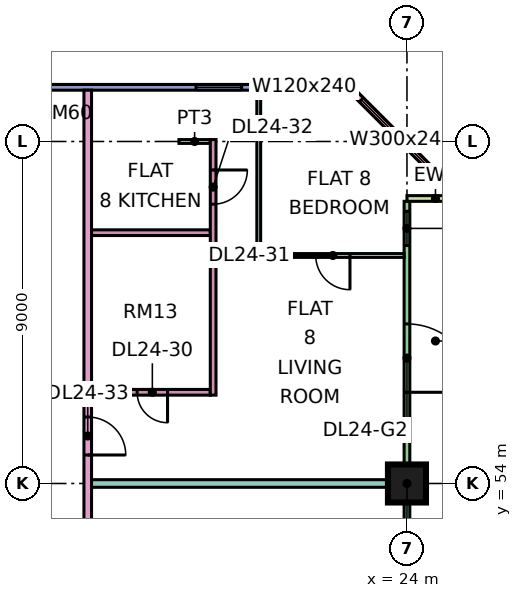
"""IFC4 building model, lengths in metres.
Left out: names, types, materials, properties, quantities, classifications, styles, units other than length and angle.
Written with IfcOpenShell. Run it as: python <this file> out.ifc"""

import sys

from ifc_helpers import new_model, si_unit, direction, frame, frame_2d, origin, origin_2d, place, context, subcontext, project, spatial, rectangle, extrude, element, fill, save


model = new_model("IFC4")
c1 = context("Model", 3, precision=1e-05, world=origin(), true_north=direction((0.0, 1.0)))
c2 = subcontext(c1, "Body", "Model", "MODEL_VIEW")
j1 = project(units=[si_unit("LENGTHUNIT", "METRE"), si_unit("PLANEANGLEUNIT", "RADIAN")], contexts=[c1])
p1 = place(None, origin())
s1 = spatial("IfcSite", under=j1, at=p1, CompositionType="ELEMENT")
p2 = place(p1, origin())
s2 = spatial("IfcBuilding", under=s1, at=p2, CompositionType="ELEMENT")
p3 = place(p2, frame((0.0, 0.0, 106.9)))
s3 = spatial("IfcBuildingStorey", under=s2, at=p3, CompositionType="ELEMENT", Elevation=106.9)
p4 = place(p3, frame((24.0, 54.0, 0.0), z_axis=(0.0, 0.0, 1.0), x_axis=(1.0, 0.0, 0.0)))
e1 = element("IfcColumn", 1, at=p4, inside=s3, PredefinedType="COLUMN", context=c2, shape_type="SweptSolid", body=[
    extrude(rectangle(XDim=1.0, YDim=1.0, at=origin_2d()), origin(), (0.0, 0.0, 1.0), 3.75),
])
p5 = place(p3, frame((24.0, 48.075, 0.0), z_axis=(0.0, 0.0, 1.0), x_axis=(0.0, 1.0, 0.0)))
e2 = element("IfcWall", 2, at=p5, inside=s3, PredefinedType="SOLIDWALL", context=c2, shape_type="SweptSolid", body=[
    extrude(rectangle(XDim=13.35, YDim=0.15, at=frame_2d((6.675, 0.0))), origin(), (0.0, 0.0, 1.0), 3.35),
])
p6 = place(p5, frame((0.562, 0.0, 0.45)))
e3 = element("IfcOpeningElement", 3, at=p6, cuts=e2, PredefinedType="OPENING", context=c2, shape_type="SweptSolid", body=[
    extrude(rectangle(XDim=4.2, YDim=2.4, at=frame_2d((2.1, 1.2))), frame((0.0, 0.085, 0.0), z_axis=(0.0, -1.0, 0.0), x_axis=(1.0, 0.0, 0.0)), (0.0, 0.0, 1.0), 0.17),
])
p7 = place(p5, frame((8.325, 0.0, 0.0)))
e4 = element("IfcOpeningElement", 4, at=p7, cuts=e2, PredefinedType="OPENING", context=c2, shape_type="SweptSolid", body=[
    extrude(rectangle(XDim=1.8, YDim=2.4, at=frame_2d((0.9, 1.2))), frame((0.0, 0.085, 0.0), z_axis=(0.0, -1.0, 0.0), x_axis=(1.0, 0.0, 0.0)), (0.0, 0.0, 1.0), 0.17),
])
p8 = place(p5, frame((12.188, 0.0, 0.45)))
e5 = element("IfcOpeningElement", 5, at=p8, cuts=e2, PredefinedType="OPENING", context=c2, shape_type="SweptSolid", body=[
    extrude(rectangle(XDim=0.9, YDim=2.4, at=frame_2d((0.45, 1.2))), frame((0.0, 0.085, 0.0), z_axis=(0.0, -1.0, 0.0), x_axis=(1.0, 0.0, 0.0)), (0.0, 0.0, 1.0), 0.17),
])
p9 = place(p3, frame((25.5, 61.5, 0.0), z_axis=(0.0, 0.0, 1.0), x_axis=(-1.0, 0.0, 0.0)))
e6 = element("IfcWall", 6, at=p9, inside=s3, PredefinedType="SOLIDWALL", context=c2, shape_type="SweptSolid", body=[
    extrude(rectangle(XDim=1.5, YDim=0.15, at=frame_2d((0.75, 0.0))), origin(), (0.0, 0.0, 1.0), 3.35),
])
p10 = place(p3, frame((25.447, 61.447, 0.0), z_axis=(0.0, 0.0, 1.0), x_axis=(-0.707106781187, 0.707106781187, 0.0)))
e7 = element("IfcWall", 7, at=p10, inside=s3, PredefinedType="SOLIDWALL", context=c2, shape_type="SweptSolid", body=[
    extrude(rectangle(XDim=4.243, YDim=0.15, at=frame_2d((2.121, 0.0))), origin(), (0.0, 0.0, 1.0), 3.35),
])
p11 = place(p10, frame((0.744, 0.0, 0.45)))
e8 = element("IfcOpeningElement", 8, at=p11, cuts=e7, PredefinedType="OPENING", context=c2, shape_type="SweptSolid", body=[
    extrude(rectangle(XDim=3.0, YDim=2.4, at=frame_2d((1.5, 1.2))), frame((0.0, 0.085, 0.0), z_axis=(0.0, -1.0, 0.0), x_axis=(1.0, 0.0, 0.0)), (0.0, 0.0, 1.0), 0.17),
])
p12 = place(p3, frame((22.5, 64.425, 0.0), z_axis=(0.0, 0.0, 1.0), x_axis=(-1.0, 0.0, 0.0)))
e9 = element("IfcWall", 9, at=p12, inside=s3, PredefinedType="SOLIDWALL", context=c2, shape_type="SweptSolid", body=[
    extrude(rectangle(XDim=10.425, YDim=0.15, at=frame_2d((5.212, 0.0))), origin(), (0.0, 0.0, 1.0), 3.35),
])
p13 = place(p12, frame((0.6, 0.0, 0.45)))
e10 = element("IfcOpeningElement", 10, at=p13, cuts=e9, PredefinedType="OPENING", context=c2, shape_type="SweptSolid", body=[
    extrude(rectangle(XDim=1.2, YDim=2.4, at=frame_2d((0.6, 1.2))), frame((0.0, 0.085, 0.0), z_axis=(0.0, -1.0, 0.0), x_axis=(1.0, 0.0, 0.0)), (0.0, 0.0, 1.0), 0.17),
])
p14 = place(p12, frame((2.85, 0.0, 0.45)))
e11 = element("IfcOpeningElement", 11, at=p14, cuts=e9, PredefinedType="OPENING", context=c2, shape_type="SweptSolid", body=[
    extrude(rectangle(XDim=1.2, YDim=2.4, at=frame_2d((0.6, 1.2))), frame((0.0, 0.085, 0.0), z_axis=(0.0, -1.0, 0.0), x_axis=(1.0, 0.0, 0.0)), (0.0, 0.0, 1.0), 0.17),
])
p15 = place(p3, frame((15.6, 51.225, 0.0), z_axis=(0.0, 0.0, 1.0), x_axis=(0.0, 1.0, 0.0)))
e12 = element("IfcWall", 12, at=p15, inside=s3, PredefinedType="PARTITIONING", context=c2, shape_type="SweptSolid", body=[
    extrude(rectangle(XDim=13.125, YDim=0.2, at=frame_2d((6.562, 0.0))), origin(), (0.0, 0.0, 1.0), 3.35),
])
p16 = place(p15, frame((3.525, 0.0, 0.0)))
e13 = element("IfcOpeningElement", 13, at=p16, cuts=e12, PredefinedType="OPENING", context=c2, shape_type="SweptSolid", body=[
    extrude(rectangle(XDim=1.0, YDim=2.1, at=frame_2d((0.5, 1.05))), frame((0.0, 0.11, 0.0), z_axis=(0.0, -1.0, 0.0), x_axis=(1.0, 0.0, 0.0)), (0.0, 0.0, 1.0), 0.22),
])
p17 = place(p3, frame((15.7, 54.0, 0.0), z_axis=(0.0, 0.0, 1.0), x_axis=(1.0, 0.0, 0.0)))
e14 = element("IfcWall", 14, at=p17, inside=s3, PredefinedType="PARTITIONING", context=c2, shape_type="SweptSolid", body=[
    extrude(rectangle(XDim=8.226, YDim=0.2, at=frame_2d((4.113, 0.0))), origin(), (0.0, 0.0, 1.0), 3.35),
])
p18 = place(p3, frame((15.7, 56.4, 0.0), z_axis=(0.0, 0.0, 1.0), x_axis=(1.0, 0.0, 0.0)))
e15 = element("IfcWall", 15, at=p18, inside=s3, PredefinedType="PARTITIONING", context=c2, shape_type="SweptSolid", body=[
    extrude(rectangle(XDim=3.125, YDim=0.15, at=frame_2d((1.562, 0.0))), origin(), (0.0, 0.0, 1.0), 3.35),
])
p19 = place(p18, frame((1.2, 0.0, 0.0)))
e16 = element("IfcOpeningElement", 16, at=p19, cuts=e15, PredefinedType="OPENING", context=c2, shape_type="SweptSolid", body=[
    extrude(rectangle(XDim=0.8, YDim=2.1, at=frame_2d((0.4, 1.05))), frame((0.0, 0.085, 0.0), z_axis=(0.0, -1.0, 0.0), x_axis=(1.0, 0.0, 0.0)), (0.0, 0.0, 1.0), 0.17),
])
p20 = place(p3, frame((15.7, 60.6, 0.0), z_axis=(0.0, 0.0, 1.0), x_axis=(1.0, 0.0, 0.0)))
e17 = element("IfcWall", 17, at=p20, inside=s3, PredefinedType="PARTITIONING", context=c2, shape_type="SweptSolid", body=[
    extrude(rectangle(XDim=3.125, YDim=0.15, at=frame_2d((1.562, 0.0))), origin(), (0.0, 0.0, 1.0), 3.35),
])
p21 = place(p3, frame((18.0, 63.0, 0.0), z_axis=(0.0, 0.0, 1.0), x_axis=(1.0, 0.0, 0.0)))
e18 = element("IfcWall", 18, at=p21, inside=s3, PredefinedType="PARTITIONING", context=c2, shape_type="SweptSolid", body=[
    extrude(rectangle(XDim=0.825, YDim=0.1, at=frame_2d((0.413, 0.0))), origin(), (0.0, 0.0, 1.0), 3.35),
])
p22 = place(p3, frame((18.9, 56.325, 0.0), z_axis=(0.0, 0.0, 1.0), x_axis=(0.0, 1.0, 0.0)))
e19 = element("IfcWall", 19, at=p22, inside=s3, PredefinedType="PARTITIONING", context=c2, shape_type="SweptSolid", body=[
    extrude(rectangle(XDim=6.725, YDim=0.15, at=frame_2d((3.363, 0.0))), origin(), (0.0, 0.0, 1.0), 3.35),
])
p23 = place(p22, frame((5.025, 0.0, 0.0)))
e20 = element("IfcOpeningElement", 20, at=p23, cuts=e19, PredefinedType="OPENING", context=c2, shape_type="SweptSolid", body=[
    extrude(rectangle(XDim=0.9, YDim=2.1, at=frame_2d((0.45, 1.05))), frame((0.0, 0.085, 0.0), z_axis=(0.0, -1.0, 0.0), x_axis=(1.0, 0.0, 0.0)), (0.0, 0.0, 1.0), 0.17),
])
p24 = place(p3, frame((20.1, 59.95, 0.0), z_axis=(0.0, 0.0, 1.0), x_axis=(0.0, 1.0, 0.0)))
e21 = element("IfcWall", 21, at=p24, inside=s3, PredefinedType="PARTITIONING", context=c2, shape_type="SweptSolid", body=[
    extrude(rectangle(XDim=4.401, YDim=0.1, at=frame_2d((2.201, 0.0))), origin(), (0.0, 0.0, 1.0), 3.35),
])
p25 = place(p3, frame((20.15, 60.0, 0.0), z_axis=(0.0, 0.0, 1.0), x_axis=(1.0, 0.0, 0.0)))
e22 = element("IfcWall", 22, at=p25, inside=s3, PredefinedType="PARTITIONING", context=c2, shape_type="SweptSolid", body=[
    extrude(rectangle(XDim=3.776, YDim=0.1, at=frame_2d((1.888, 0.0))), origin(), (0.0, 0.0, 1.0), 3.35),
])
p26 = place(p25, frame((1.45, 0.0, 0.0)))
e23 = element("IfcOpeningElement", 23, at=p26, cuts=e22, PredefinedType="OPENING", context=c2, shape_type="SweptSolid", body=[
    extrude(rectangle(XDim=0.9, YDim=2.1, at=frame_2d((0.45, 1.05))), frame((0.0, 0.06, 0.0), z_axis=(0.0, -1.0, 0.0), x_axis=(1.0, 0.0, 0.0)), (0.0, 0.0, 1.0), 0.12),
])
p27 = place(p7, frame((1.8, 0.0, 0.0), z_axis=(0.0, 0.0, 1.0), x_axis=(-1.0, 0.0, 0.0)))
e24 = element("IfcDoor", 24, at=p27, inside=s3, OperationType="DOUBLE_DOOR_SINGLE_SWING", PredefinedType="DOOR", context=c2, shape_type="SweptSolid", body=[
    extrude(rectangle(XDim=1.8, YDim=2.4, at=frame_2d((0.9, 1.2))), frame((0.0, 0.025, 0.0), z_axis=(0.0, -1.0, 0.0), x_axis=(1.0, 0.0, 0.0)), (0.0, 0.0, 1.0), 0.05),
])
fill(e4, e24)
p28 = place(p8, origin())
e25 = element("IfcWindow", 25, at=p28, inside=s3, PartitioningType="SINGLE_PANEL", PredefinedType="WINDOW", context=c2, shape_type="SweptSolid", body=[
    extrude(rectangle(XDim=0.9, YDim=2.4, at=frame_2d((0.45, 1.2))), frame((0.0, 0.03, 0.0), z_axis=(0.0, -1.0, 0.0), x_axis=(1.0, 0.0, 0.0)), (0.0, 0.0, 1.0), 0.06),
])
fill(e5, e25)
p29 = place(p11, origin())
e26 = element("IfcWindow", 26, at=p29, inside=s3, PartitioningType="SINGLE_PANEL", PredefinedType="WINDOW", context=c2, shape_type="SweptSolid", body=[
    extrude(rectangle(XDim=3.0, YDim=2.4, at=frame_2d((1.5, 1.2))), frame((0.0, 0.03, 0.0), z_axis=(0.0, -1.0, 0.0), x_axis=(1.0, 0.0, 0.0)), (0.0, 0.0, 1.0), 0.06),
])
fill(e8, e26)
p30 = place(p13, origin())
e27 = element("IfcWindow", 27, at=p30, inside=s3, PartitioningType="SINGLE_PANEL", PredefinedType="WINDOW", context=c2, shape_type="SweptSolid", body=[
    extrude(rectangle(XDim=1.2, YDim=2.4, at=frame_2d((0.6, 1.2))), frame((0.0, 0.03, 0.0), z_axis=(0.0, -1.0, 0.0), x_axis=(1.0, 0.0, 0.0)), (0.0, 0.0, 1.0), 0.06),
])
fill(e10, e27)
p31 = place(p14, origin())
e28 = element("IfcWindow", 28, at=p31, inside=s3, PartitioningType="SINGLE_PANEL", PredefinedType="WINDOW", context=c2, shape_type="SweptSolid", body=[
    extrude(rectangle(XDim=1.2, YDim=2.4, at=frame_2d((0.6, 1.2))), frame((0.0, 0.03, 0.0), z_axis=(0.0, -1.0, 0.0), x_axis=(1.0, 0.0, 0.0)), (0.0, 0.0, 1.0), 0.06),
])
fill(e11, e28)
p32 = place(p19, origin())
e29 = element("IfcDoor", 29, at=p32, inside=s3, OperationType="SINGLE_SWING_RIGHT", PredefinedType="DOOR", context=c2, shape_type="SweptSolid", body=[
    extrude(rectangle(XDim=0.8, YDim=2.1, at=frame_2d((0.4, 1.05))), frame((0.0, 0.025, 0.0), z_axis=(0.0, -1.0, 0.0), x_axis=(1.0, 0.0, 0.0)), (0.0, 0.0, 1.0), 0.05),
])
fill(e16, e29)
p33 = place(p26, origin())
e30 = element("IfcDoor", 30, at=p33, inside=s3, OperationType="SINGLE_SWING_RIGHT", PredefinedType="DOOR", context=c2, shape_type="SweptSolid", body=[
    extrude(rectangle(XDim=0.9, YDim=2.1, at=frame_2d((0.45, 1.05))), frame((0.0, 0.025, 0.0), z_axis=(0.0, -1.0, 0.0), x_axis=(1.0, 0.0, 0.0)), (0.0, 0.0, 1.0), 0.05),
])
fill(e23, e30)
p34 = place(p23, origin())
e31 = element("IfcDoor", 31, at=p34, inside=s3, OperationType="SINGLE_SWING_RIGHT", PredefinedType="DOOR", context=c2, shape_type="SweptSolid", body=[
    extrude(rectangle(XDim=0.9, YDim=2.1, at=frame_2d((0.45, 1.05))), frame((0.0, 0.025, 0.0), z_axis=(0.0, -1.0, 0.0), x_axis=(1.0, 0.0, 0.0)), (0.0, 0.0, 1.0), 0.05),
])
fill(e20, e31)
p35 = place(p16, frame((1.0, 0.0, 0.0), z_axis=(0.0, 0.0, 1.0), x_axis=(-1.0, 0.0, 0.0)))
e32 = element("IfcDoor", 32, at=p35, inside=s3, OperationType="SINGLE_SWING_LEFT", PredefinedType="DOOR", context=c2, shape_type="SweptSolid", body=[
    extrude(rectangle(XDim=1.0, YDim=2.1, at=frame_2d((0.5, 1.05))), frame((0.0, 0.025, 0.0), z_axis=(0.0, -1.0, 0.0), x_axis=(1.0, 0.0, 0.0)), (0.0, 0.0, 1.0), 0.05),
])
fill(e13, e32)
save(model, sys.argv[1])
